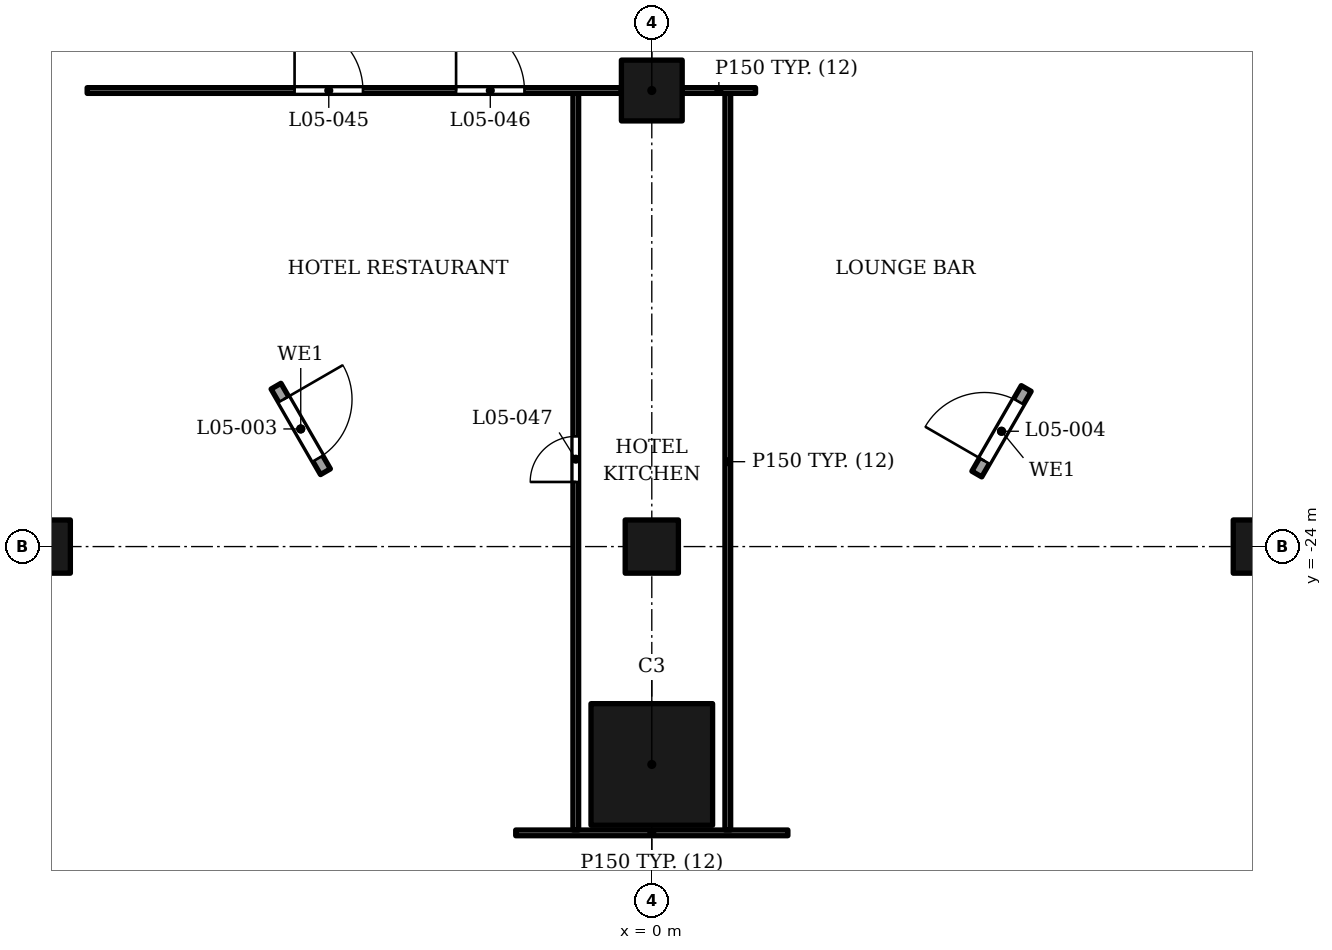
"""IFC4 building model, lengths in metres.
Left out: names, types, materials, properties, quantities, classifications, styles, units other than length and angle.
Written with IfcOpenShell. Run it as: python <this file> out.ifc"""

import sys

from ifc_helpers import new_model, si_unit, direction, frame, frame_2d, origin, origin_2d, place, context, subcontext, project, spatial, polyline, rectangle, outline, extrude, element, fill, save


model = new_model("IFC4")
c1 = context("Model", 3, precision=1e-05, world=origin(), true_north=direction((0.0, 1.0)))
c2 = subcontext(c1, "Body", "Model", "MODEL_VIEW")
j1 = project(units=[si_unit("LENGTHUNIT", "METRE"), si_unit("PLANEANGLEUNIT", "RADIAN")], contexts=[c1])
p1 = place(None, origin())
s1 = spatial("IfcSite", under=j1, at=p1, CompositionType="ELEMENT")
p2 = place(p1, origin())
s2 = spatial("IfcBuilding", under=s1, at=p2, CompositionType="ELEMENT")
p3 = place(p2, frame((0.0, 0.0, 40.0)))
s3 = spatial("IfcBuildingStorey", under=s2, at=p3, CompositionType="ELEMENT", Elevation=40.0)
for number, where, z_axis, x_axis in (
    (1, (-16.0, -24.0, 0.0), (0.0, 0.0, 1.0), (1.0, 0.0, 0.0)),
    (2, (0.0, -24.0, 0.0), (0.0, 0.0, 1.0), (1.0, 0.0, 0.0)),
    (3, (16.0, -24.0, 0.0), (0.0, 0.0, 1.0), (1.0, 0.0, 0.0)),
):
    element("IfcColumn", number, at=place(p3, frame(where, z_axis=z_axis, x_axis=x_axis)), inside=s3, PredefinedType="COLUMN", context=c2, shape_type="SweptSolid", body=[
        extrude(rectangle(XDim=1.4, YDim=1.4, at=origin_2d()), origin(), (0.0, 0.0, 1.0), 6.0),
    ])
p4 = place(p3, frame((0.0, -29.733, 0.0), z_axis=(0.0, 0.0, 1.0), x_axis=(0.0, 1.0, 0.0)))
e4 = element("IfcColumn", 4, at=p4, inside=s3, PredefinedType="COLUMN", context=c2, shape_type="SweptSolid", body=[
    extrude(rectangle(XDim=3.2, YDim=3.2, at=origin_2d()), origin(), (0.0, 0.0, 1.0), 6.0),
])
p5 = place(p3, frame((0.0, -12.0, 0.0), z_axis=(0.0, 0.0, 1.0), x_axis=(1.0, 0.0, 0.0)))
e5 = element("IfcColumn", 5, at=p5, inside=s3, PredefinedType="COLUMN", context=c2, shape_type="SweptSolid", body=[
    extrude(rectangle(XDim=1.6, YDim=1.6, at=origin_2d()), origin(), (0.0, 0.0, 1.0), 6.0),
])
p6 = place(p3, frame((-9.888, -19.779, 0.0), z_axis=(0.0, 0.0, 1.0), x_axis=(0.500006934395, -0.866021400173, 0.0)))
e6 = element("IfcWall", 6, at=p6, inside=s3, PredefinedType="ELEMENTEDWALL", context=c2, shape_type="SweptSolid", body=[
    extrude(rectangle(XDim=2.6, YDim=0.3, at=frame_2d((1.3, 0.0))), origin(), (0.0, 0.0, 1.0), 2.95),
])
p7 = place(p6, frame((0.4, 0.0, 0.0)))
e7 = element("IfcOpeningElement", 7, at=p7, cuts=e6, PredefinedType="OPENING", context=c2, shape_type="SweptSolid", body=[
    extrude(rectangle(XDim=1.8, YDim=2.7, at=frame_2d((0.9, 1.35))), frame((0.0, 0.16, 0.0), z_axis=(0.0, -1.0, 0.0), x_axis=(1.0, 0.0, 0.0)), (0.0, 0.0, 1.0), 0.32),
])
p8 = place(p3, frame((8.552, -22.092, 0.0), z_axis=(0.0, 0.0, 1.0), x_axis=(0.500047596559, 0.865997922154, 0.0)))
e8 = element("IfcWall", 8, at=p8, inside=s3, PredefinedType="ELEMENTEDWALL", context=c2, shape_type="SweptSolid", body=[
    extrude(rectangle(XDim=2.6, YDim=0.3, at=frame_2d((1.3, 0.0))), origin(), (0.0, 0.0, 1.0), 2.95),
])
p9 = place(p8, frame((0.4, 0.0, 0.0)))
e9 = element("IfcOpeningElement", 9, at=p9, cuts=e8, PredefinedType="OPENING", context=c2, shape_type="SweptSolid", body=[
    extrude(rectangle(XDim=1.8, YDim=2.7, at=frame_2d((0.9, 1.35))), frame((0.0, 0.16, 0.0), z_axis=(0.0, -1.0, 0.0), x_axis=(1.0, 0.0, 0.0)), (0.0, 0.0, 1.0), 0.32),
])
p10 = place(p3, origin())
e10 = element("IfcWall", 10, at=p10, inside=s3, PredefinedType="USERDEFINED", context=c2, shape_type="SweptSolid", body=[
    extrude(outline(polyline([(-13.6, -30.6), (-13.6, -29.4), (-19.6, -29.4), (-19.6, -30.6), (-13.6, -30.6)])), origin(), (0.0, 0.0, 1.0), 0.8),
])
p11 = place(p3, frame((-3.581, -31.533, 0.0), z_axis=(0.0, 0.0, 1.0), x_axis=(1.0, 0.0, 0.0)))
e11 = element("IfcWall", 11, at=p11, inside=s3, PredefinedType="PARTITIONING", context=c2, shape_type="SweptSolid", body=[
    extrude(rectangle(XDim=7.162, YDim=0.15, at=frame_2d((3.581, 0.0))), origin(), (0.0, 0.0, 1.0), 2.95),
])
p12 = place(p3, frame((-2.0, -31.458, 0.0), z_axis=(0.0, 0.0, 1.0), x_axis=(0.0, 1.0, 0.0)))
e12 = element("IfcWall", 12, at=p12, inside=s3, PredefinedType="PARTITIONING", context=c2, shape_type="SweptSolid", body=[
    extrude(rectangle(XDim=19.383, YDim=0.15, at=frame_2d((9.691, 0.0))), origin(), (0.0, 0.0, 1.0), 2.95),
])
p13 = place(p12, frame((9.158, 0.0, 0.0)))
e13 = element("IfcOpeningElement", 13, at=p13, cuts=e12, PredefinedType="OPENING", context=c2, shape_type="SweptSolid", body=[
    extrude(rectangle(XDim=1.2, YDim=2.1, at=frame_2d((0.6, 1.05))), frame((0.0, 0.085, 0.0), z_axis=(0.0, -1.0, 0.0), x_axis=(1.0, 0.0, 0.0)), (0.0, 0.0, 1.0), 0.17),
])
p14 = place(p3, frame((2.0, -31.458, 0.0), z_axis=(0.0, 0.0, 1.0), x_axis=(0.0, 1.0, 0.0)))
e14 = element("IfcWall", 14, at=p14, inside=s3, PredefinedType="PARTITIONING", context=c2, shape_type="SweptSolid", body=[
    extrude(rectangle(XDim=19.383, YDim=0.15, at=frame_2d((9.691, 0.0))), origin(), (0.0, 0.0, 1.0), 2.95),
])
p15 = place(p3, frame((-14.858, -12.0, 0.0), z_axis=(0.0, 0.0, 1.0), x_axis=(1.0, 0.0, 0.0)))
e15 = element("IfcWall", 15, at=p15, inside=s3, PredefinedType="PARTITIONING", context=c2, shape_type="SweptSolid", body=[
    extrude(rectangle(XDim=14.058, YDim=0.15, at=frame_2d((7.029, 0.0))), origin(), (0.0, 0.0, 1.0), 2.95),
])
p16 = place(p15, frame((5.458, 0.0, 0.0)))
e16 = element("IfcOpeningElement", 16, at=p16, cuts=e15, PredefinedType="OPENING", context=c2, shape_type="SweptSolid", body=[
    extrude(rectangle(XDim=1.8, YDim=2.1, at=frame_2d((0.9, 1.05))), frame((0.0, 0.085, 0.0), z_axis=(0.0, -1.0, 0.0), x_axis=(1.0, 0.0, 0.0)), (0.0, 0.0, 1.0), 0.17),
])
p17 = place(p15, frame((9.708, 0.0, 0.0)))
e17 = element("IfcOpeningElement", 17, at=p17, cuts=e15, PredefinedType="OPENING", context=c2, shape_type="SweptSolid", body=[
    extrude(rectangle(XDim=1.8, YDim=2.1, at=frame_2d((0.9, 1.05))), frame((0.0, 0.085, 0.0), z_axis=(0.0, -1.0, 0.0), x_axis=(1.0, 0.0, 0.0)), (0.0, 0.0, 1.0), 0.17),
])
p18 = place(p3, frame((0.8, -12.0, 0.0), z_axis=(0.0, 0.0, 1.0), x_axis=(1.0, 0.0, 0.0)))
e18 = element("IfcWall", 18, at=p18, inside=s3, PredefinedType="PARTITIONING", context=c2, shape_type="SweptSolid", body=[
    extrude(rectangle(XDim=1.93, YDim=0.15, at=frame_2d((0.965, 0.0))), origin(), (0.0, 0.0, 1.0), 2.95),
])
p19 = place(p7, origin())
e19 = element("IfcDoor", 19, at=p19, inside=s3, OperationType="DOUBLE_DOOR_SINGLE_SWING", PredefinedType="DOOR", context=c2, shape_type="SweptSolid", body=[
    extrude(rectangle(XDim=1.8, YDim=2.7, at=frame_2d((0.9, 1.35))), frame((0.0, 0.025, 0.0), z_axis=(0.0, -1.0, 0.0), x_axis=(1.0, 0.0, 0.0)), (0.0, 0.0, 1.0), 0.05),
])
fill(e7, e19)
p20 = place(p9, origin())
e20 = element("IfcDoor", 20, at=p20, inside=s3, OperationType="DOUBLE_DOOR_SINGLE_SWING", PredefinedType="DOOR", context=c2, shape_type="SweptSolid", body=[
    extrude(rectangle(XDim=1.8, YDim=2.7, at=frame_2d((0.9, 1.35))), frame((0.0, 0.025, 0.0), z_axis=(0.0, -1.0, 0.0), x_axis=(1.0, 0.0, 0.0)), (0.0, 0.0, 1.0), 0.05),
])
fill(e9, e20)
p21 = place(p16, origin())
e21 = element("IfcDoor", 21, at=p21, inside=s3, OperationType="DOUBLE_DOOR_SINGLE_SWING", PredefinedType="DOOR", context=c2, shape_type="SweptSolid", body=[
    extrude(rectangle(XDim=1.8, YDim=2.1, at=frame_2d((0.9, 1.05))), frame((0.0, 0.025, 0.0), z_axis=(0.0, -1.0, 0.0), x_axis=(1.0, 0.0, 0.0)), (0.0, 0.0, 1.0), 0.05),
])
fill(e16, e21)
p22 = place(p17, origin())
e22 = element("IfcDoor", 22, at=p22, inside=s3, OperationType="DOUBLE_DOOR_SINGLE_SWING", PredefinedType="DOOR", context=c2, shape_type="SweptSolid", body=[
    extrude(rectangle(XDim=1.8, YDim=2.1, at=frame_2d((0.9, 1.05))), frame((0.0, 0.025, 0.0), z_axis=(0.0, -1.0, 0.0), x_axis=(1.0, 0.0, 0.0)), (0.0, 0.0, 1.0), 0.05),
])
fill(e17, e22)
p23 = place(p13, origin())
e23 = element("IfcDoor", 23, at=p23, inside=s3, OperationType="SINGLE_SWING_LEFT", PredefinedType="DOOR", context=c2, shape_type="SweptSolid", body=[
    extrude(rectangle(XDim=1.2, YDim=2.1, at=frame_2d((0.6, 1.05))), frame((0.0, 0.025, 0.0), z_axis=(0.0, -1.0, 0.0), x_axis=(1.0, 0.0, 0.0)), (0.0, 0.0, 1.0), 0.05),
])
fill(e13, e23)
save(model, sys.argv[1])
